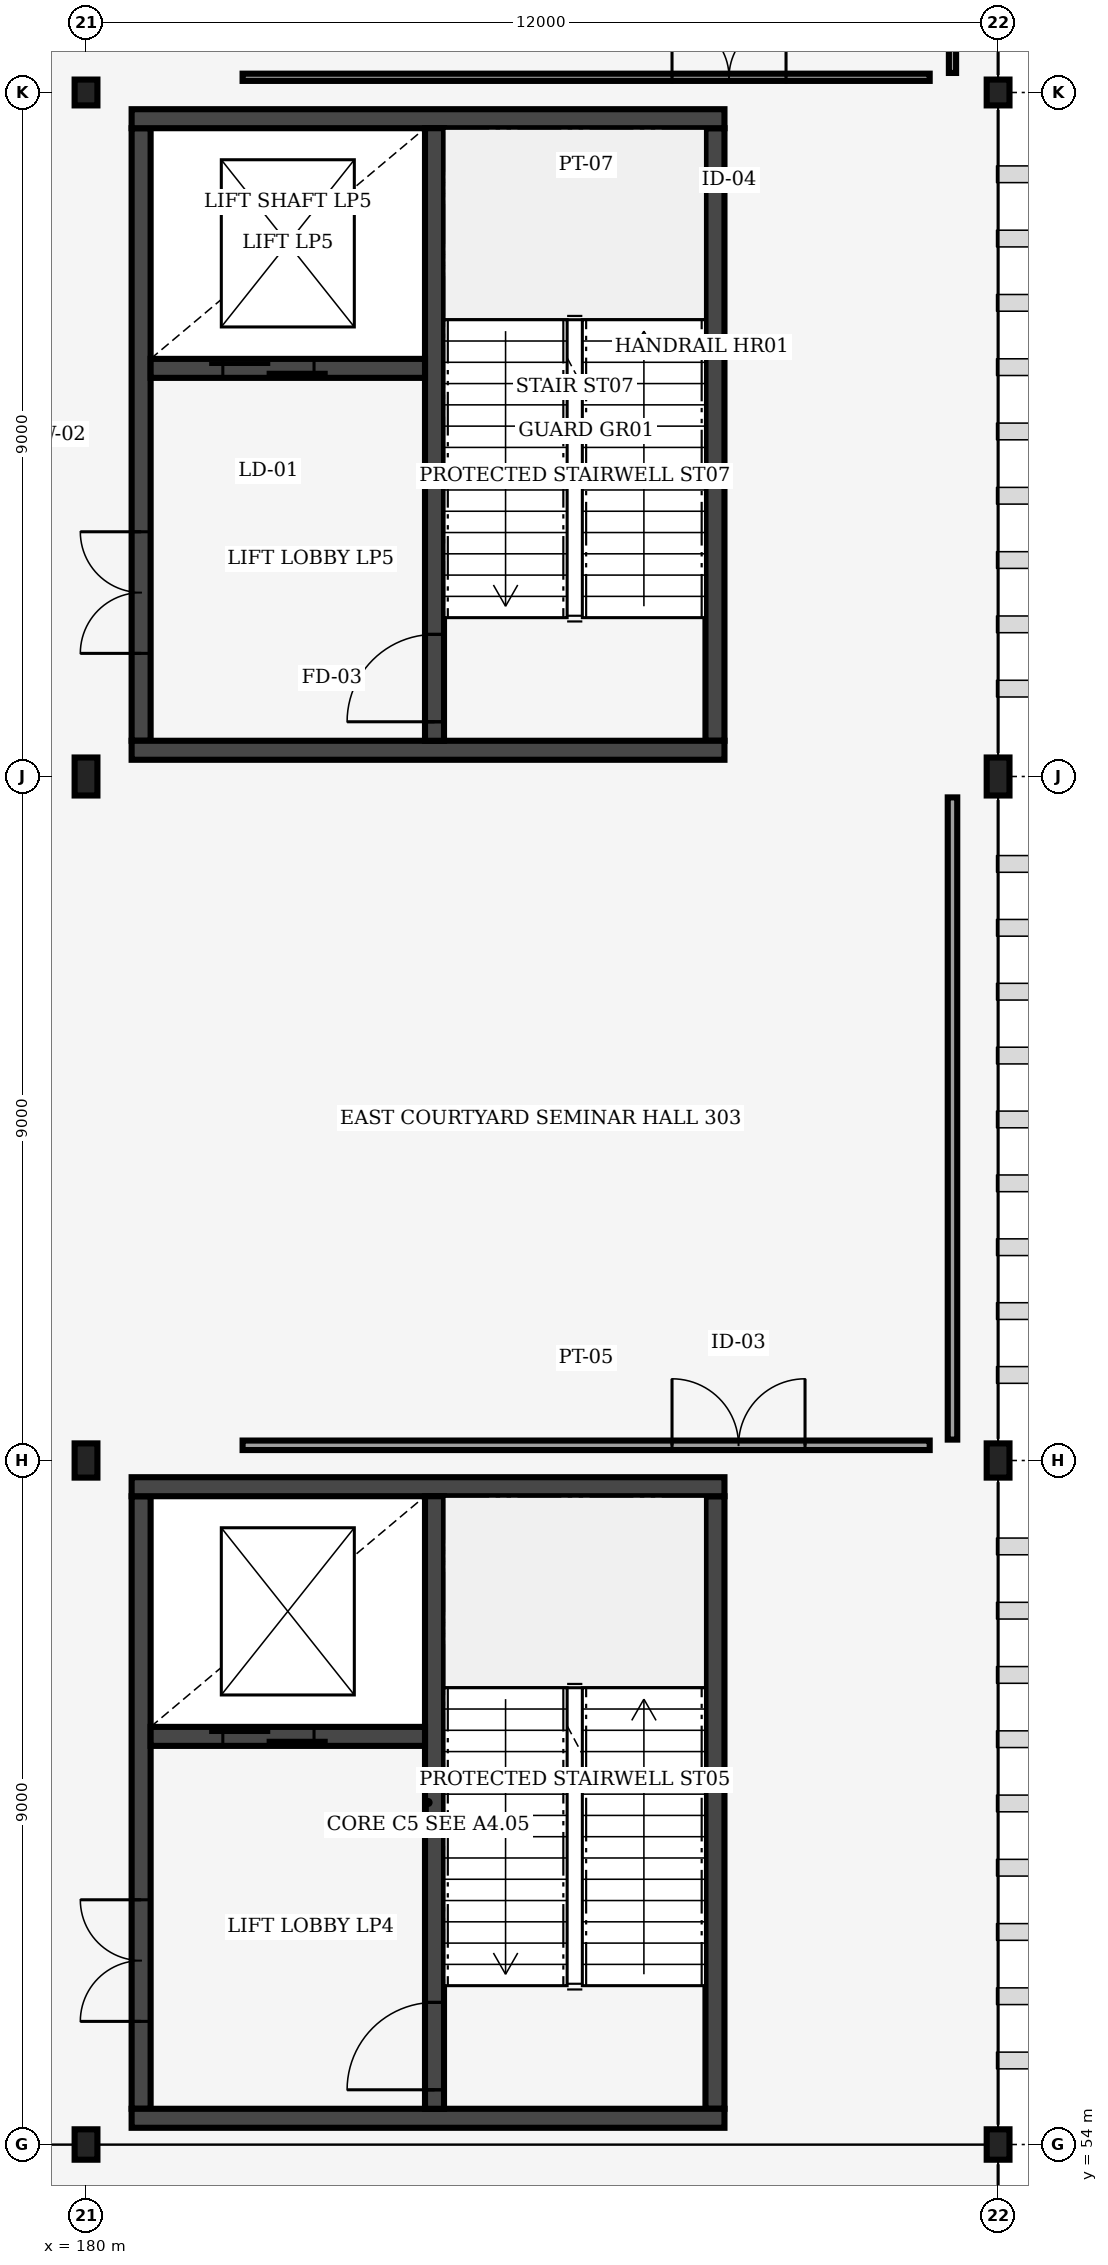
"""IFC4 building model, lengths in metres.
Left out: names, types, materials, properties, quantities, classifications, styles, units other than length and angle.
Written with IfcOpenShell. Run it as: python <this file> out.ifc"""

import sys

from ifc_helpers import new_model, si_unit, direction, frame, frame_2d, origin, origin_2d, place, context, subcontext, project, spatial, rectangle, i_section, extrude, element, fill, save


model = new_model("IFC4")
c1 = context("Model", 3, precision=1e-05, world=origin(), true_north=direction((0.0, 1.0)))
c2 = subcontext(c1, "Body", "Model", "MODEL_VIEW")
j1 = project(units=[si_unit("LENGTHUNIT", "METRE"), si_unit("PLANEANGLEUNIT", "RADIAN")], contexts=[c1])
p1 = place(None, origin())
s1 = spatial("IfcSite", under=j1, at=p1, CompositionType="ELEMENT")
p2 = place(p1, origin())
s2 = spatial("IfcBuilding", under=s1, at=p2, CompositionType="ELEMENT")
p3 = place(p2, frame((0.0, 0.0, 18.0)))
s3 = spatial("IfcBuildingStorey", under=s2, at=p3, CompositionType="ELEMENT", Elevation=18.0)
p4 = place(p3, frame((180.0, 54.0, 0.0), z_axis=(0.0, 0.0, 1.0), x_axis=(1.0, 0.0, 0.0)))
e1 = element("IfcColumn", 1, at=p4, inside=s3, PredefinedType="COLUMN", context=c2, shape_type="SweptSolid", body=[
    extrude(i_section(OverallWidth=0.3, OverallDepth=0.4, WebThickness=0.013, FlangeThickness=0.024, FilletRadius=0.027, at=origin_2d()), origin(), (0.0, 0.0, 1.0), 4.8),
])
p5 = place(p3, frame((180.0, 63.0, 0.0), z_axis=(0.0, 0.0, 1.0), x_axis=(1.0, 0.0, 0.0)))
e2 = element("IfcColumn", 2, at=p5, inside=s3, PredefinedType="COLUMN", context=c2, shape_type="SweptSolid", body=[
    extrude(i_section(OverallWidth=0.3, OverallDepth=0.45, WebThickness=0.014, FlangeThickness=0.026, FilletRadius=0.027, at=origin_2d()), origin(), (0.0, 0.0, 1.0), 4.8),
])
p6 = place(p3, frame((180.0, 72.0, 0.0), z_axis=(0.0, 0.0, 1.0), x_axis=(1.0, 0.0, 0.0)))
e3 = element("IfcColumn", 3, at=p6, inside=s3, PredefinedType="COLUMN", context=c2, shape_type="SweptSolid", body=[
    extrude(i_section(OverallWidth=0.3, OverallDepth=0.5, WebThickness=0.014, FlangeThickness=0.028, FilletRadius=0.027, at=origin_2d()), origin(), (0.0, 0.0, 1.0), 4.8),
])
p7 = place(p3, frame((180.0, 81.0, 0.0), z_axis=(0.0, 0.0, 1.0), x_axis=(1.0, 0.0, 0.0)))
e4 = element("IfcColumn", 4, at=p7, inside=s3, PredefinedType="COLUMN", context=c2, shape_type="SweptSolid", body=[
    extrude(i_section(OverallWidth=0.3, OverallDepth=0.34, WebThickness=0.012, FlangeThickness=0.021, FilletRadius=0.027, at=origin_2d()), origin(), (0.0, 0.0, 1.0), 4.8),
])
p8 = place(p3, frame((192.0, 54.0, 0.0), z_axis=(0.0, 0.0, 1.0), x_axis=(1.0, 0.0, 0.0)))
e5 = element("IfcColumn", 5, at=p8, inside=s3, PredefinedType="COLUMN", context=c2, shape_type="SweptSolid", body=[
    extrude(i_section(OverallWidth=0.3, OverallDepth=0.4, WebThickness=0.013, FlangeThickness=0.024, FilletRadius=0.027, at=origin_2d()), origin(), (0.0, 0.0, 1.0), 4.8),
])
p9 = place(p3, frame((192.0, 63.0, 0.0), z_axis=(0.0, 0.0, 1.0), x_axis=(1.0, 0.0, 0.0)))
e6 = element("IfcColumn", 6, at=p9, inside=s3, PredefinedType="COLUMN", context=c2, shape_type="SweptSolid", body=[
    extrude(i_section(OverallWidth=0.3, OverallDepth=0.45, WebThickness=0.014, FlangeThickness=0.026, FilletRadius=0.027, at=origin_2d()), origin(), (0.0, 0.0, 1.0), 4.8),
])
p10 = place(p3, frame((192.0, 72.0, 0.0), z_axis=(0.0, 0.0, 1.0), x_axis=(1.0, 0.0, 0.0)))
e7 = element("IfcColumn", 7, at=p10, inside=s3, PredefinedType="COLUMN", context=c2, shape_type="SweptSolid", body=[
    extrude(i_section(OverallWidth=0.3, OverallDepth=0.5, WebThickness=0.014, FlangeThickness=0.028, FilletRadius=0.027, at=origin_2d()), origin(), (0.0, 0.0, 1.0), 4.8),
])
p11 = place(p3, frame((192.0, 81.0, 0.0), z_axis=(0.0, 0.0, 1.0), x_axis=(1.0, 0.0, 0.0)))
e8 = element("IfcColumn", 8, at=p11, inside=s3, PredefinedType="COLUMN", context=c2, shape_type="SweptSolid", body=[
    extrude(i_section(OverallWidth=0.3, OverallDepth=0.34, WebThickness=0.012, FlangeThickness=0.021, FilletRadius=0.027, at=origin_2d()), origin(), (0.0, 0.0, 1.0), 4.8),
])
p12 = place(p3, frame((180.725, 54.47, 0.0), z_axis=(0.0, 0.0, 1.0), x_axis=(0.0, 1.0, 0.0)))
e9 = element("IfcWall", 9, at=p12, inside=s3, PredefinedType="SHEAR", context=c2, shape_type="SweptSolid", body=[
    extrude(rectangle(XDim=8.06, YDim=0.25, at=frame_2d((4.03, 0.0))), origin(), (0.0, 0.0, 1.0), 4.44),
])
p13 = place(p12, frame((1.15, 0.0, 0.0)))
e10 = element("IfcOpeningElement", 10, at=p13, cuts=e9, PredefinedType="OPENING", context=c2, shape_type="SweptSolid", body=[
    extrude(rectangle(XDim=1.6, YDim=2.2, at=frame_2d((0.8, 1.1))), frame((0.0, 0.135, 0.0), z_axis=(0.0, -1.0, 0.0), x_axis=(1.0, 0.0, 0.0)), (0.0, 0.0, 1.0), 0.27),
])
p14 = place(p3, frame((188.275, 54.47, 0.0), z_axis=(0.0, 0.0, 1.0), x_axis=(0.0, 1.0, 0.0)))
e11 = element("IfcWall", 11, at=p14, inside=s3, PredefinedType="SHEAR", context=c2, shape_type="SweptSolid", body=[
    extrude(rectangle(XDim=8.06, YDim=0.25, at=frame_2d((4.03, 0.0))), origin(), (0.0, 0.0, 1.0), 4.44),
])
for number, where, z_axis, x_axis in (
    (12, (180.6, 54.345, 0.0), (0.0, 0.0, 1.0), (1.0, 0.0, 0.0)),
    (13, (180.6, 62.655, 0.0), (0.0, 0.0, 1.0), (1.0, 0.0, 0.0)),
):
    element("IfcWall", number, at=place(p3, frame(where, z_axis=z_axis, x_axis=x_axis)), inside=s3, PredefinedType="SHEAR", context=c2, shape_type="SweptSolid", body=[
        extrude(rectangle(XDim=7.8, YDim=0.25, at=frame_2d((3.9, 0.0))), origin(), (0.0, 0.0, 1.0), 4.44),
    ])
p15 = place(p3, frame((184.585, 54.47, 0.0), z_axis=(0.0, 0.0, 1.0), x_axis=(0.0, 1.0, 0.0)))
e14 = element("IfcWall", 14, at=p15, inside=s3, PredefinedType="SHEAR", context=c2, shape_type="SweptSolid", body=[
    extrude(rectangle(XDim=8.06, YDim=0.25, at=frame_2d((4.03, 0.0))), origin(), (0.0, 0.0, 1.0), 4.44),
])
p16 = place(p15, frame((0.25, 0.0, 0.0)))
e15 = element("IfcOpeningElement", 15, at=p16, cuts=e14, PredefinedType="OPENING", context=c2, shape_type="SweptSolid", body=[
    extrude(rectangle(XDim=1.15, YDim=2.15, at=frame_2d((0.575, 1.075))), frame((0.0, 0.135, 0.0), z_axis=(0.0, -1.0, 0.0), x_axis=(1.0, 0.0, 0.0)), (0.0, 0.0, 1.0), 0.27),
])
p17 = place(p3, frame((180.85, 59.37, 0.0), z_axis=(0.0, 0.0, 1.0), x_axis=(1.0, 0.0, 0.0)))
e16 = element("IfcWall", 16, at=p17, inside=s3, PredefinedType="SHEAR", context=c2, shape_type="SweptSolid", body=[
    extrude(rectangle(XDim=3.61, YDim=0.25, at=frame_2d((1.805, 0.0))), origin(), (0.0, 0.0, 1.0), 4.44),
])
p18 = place(p17, frame((0.95, 0.0, 0.0)))
e17 = element("IfcOpeningElement", 17, at=p18, cuts=e16, PredefinedType="OPENING", context=c2, shape_type="SweptSolid", body=[
    extrude(rectangle(XDim=1.2, YDim=2.2, at=frame_2d((0.6, 1.1))), frame((0.0, 0.135, 0.0), z_axis=(0.0, -1.0, 0.0), x_axis=(1.0, 0.0, 0.0)), (0.0, 0.0, 1.0), 0.27),
])
p19 = place(p3, frame((180.725, 72.47, 0.0), z_axis=(0.0, 0.0, 1.0), x_axis=(0.0, 1.0, 0.0)))
e18 = element("IfcWall", 18, at=p19, inside=s3, PredefinedType="SHEAR", context=c2, shape_type="SweptSolid", body=[
    extrude(rectangle(XDim=8.06, YDim=0.25, at=frame_2d((4.03, 0.0))), origin(), (0.0, 0.0, 1.0), 4.44),
])
p20 = place(p19, frame((1.15, 0.0, 0.0)))
e19 = element("IfcOpeningElement", 19, at=p20, cuts=e18, PredefinedType="OPENING", context=c2, shape_type="SweptSolid", body=[
    extrude(rectangle(XDim=1.6, YDim=2.2, at=frame_2d((0.8, 1.1))), frame((0.0, 0.135, 0.0), z_axis=(0.0, -1.0, 0.0), x_axis=(1.0, 0.0, 0.0)), (0.0, 0.0, 1.0), 0.27),
])
p21 = place(p3, frame((188.275, 72.47, 0.0), z_axis=(0.0, 0.0, 1.0), x_axis=(0.0, 1.0, 0.0)))
e20 = element("IfcWall", 20, at=p21, inside=s3, PredefinedType="SHEAR", context=c2, shape_type="SweptSolid", body=[
    extrude(rectangle(XDim=8.06, YDim=0.25, at=frame_2d((4.03, 0.0))), origin(), (0.0, 0.0, 1.0), 4.44),
])
for number, where, z_axis, x_axis in (
    (21, (180.6, 72.345, 0.0), (0.0, 0.0, 1.0), (1.0, 0.0, 0.0)),
    (22, (180.6, 80.655, 0.0), (0.0, 0.0, 1.0), (1.0, 0.0, 0.0)),
):
    element("IfcWall", number, at=place(p3, frame(where, z_axis=z_axis, x_axis=x_axis)), inside=s3, PredefinedType="SHEAR", context=c2, shape_type="SweptSolid", body=[
        extrude(rectangle(XDim=7.8, YDim=0.25, at=frame_2d((3.9, 0.0))), origin(), (0.0, 0.0, 1.0), 4.44),
    ])
p22 = place(p3, frame((184.585, 72.47, 0.0), z_axis=(0.0, 0.0, 1.0), x_axis=(0.0, 1.0, 0.0)))
e23 = element("IfcWall", 23, at=p22, inside=s3, PredefinedType="SHEAR", context=c2, shape_type="SweptSolid", body=[
    extrude(rectangle(XDim=8.06, YDim=0.25, at=frame_2d((4.03, 0.0))), origin(), (0.0, 0.0, 1.0), 4.44),
])
p23 = place(p22, frame((0.25, 0.0, 0.0)))
e24 = element("IfcOpeningElement", 24, at=p23, cuts=e23, PredefinedType="OPENING", context=c2, shape_type="SweptSolid", body=[
    extrude(rectangle(XDim=1.15, YDim=2.15, at=frame_2d((0.575, 1.075))), frame((0.0, 0.135, 0.0), z_axis=(0.0, -1.0, 0.0), x_axis=(1.0, 0.0, 0.0)), (0.0, 0.0, 1.0), 0.27),
])
p24 = place(p3, frame((180.85, 77.37, 0.0), z_axis=(0.0, 0.0, 1.0), x_axis=(1.0, 0.0, 0.0)))
e25 = element("IfcWall", 25, at=p24, inside=s3, PredefinedType="SHEAR", context=c2, shape_type="SweptSolid", body=[
    extrude(rectangle(XDim=3.61, YDim=0.25, at=frame_2d((1.805, 0.0))), origin(), (0.0, 0.0, 1.0), 4.44),
])
p25 = place(p24, frame((0.95, 0.0, 0.0)))
e26 = element("IfcOpeningElement", 26, at=p25, cuts=e25, PredefinedType="OPENING", context=c2, shape_type="SweptSolid", body=[
    extrude(rectangle(XDim=1.2, YDim=2.2, at=frame_2d((0.6, 1.1))), frame((0.0, 0.135, 0.0), z_axis=(0.0, -1.0, 0.0), x_axis=(1.0, 0.0, 0.0)), (0.0, 0.0, 1.0), 0.27),
])
p26 = place(p3, frame((182.06, 63.2, 0.0), z_axis=(0.0, 0.0, 1.0), x_axis=(1.0, 0.0, 0.0)))
e27 = element("IfcWall", 27, at=p26, inside=s3, PredefinedType="PARTITIONING", context=c2, shape_type="SweptSolid", body=[
    extrude(rectangle(XDim=9.04, YDim=0.125, at=frame_2d((4.52, 0.0))), origin(), (0.0, 0.0, 1.0), 3.6),
])
p27 = place(p26, frame((5.65, 0.0, 0.0)))
e28 = element("IfcOpeningElement", 28, at=p27, cuts=e27, PredefinedType="OPENING", context=c2, shape_type="SweptSolid", body=[
    extrude(rectangle(XDim=1.75, YDim=2.3, at=frame_2d((0.875, 1.15))), frame((0.0, 0.073, 0.0), z_axis=(0.0, -1.0, 0.0), x_axis=(1.0, 0.0, 0.0)), (0.0, 0.0, 1.0), 0.145),
])
p28 = place(p3, frame((191.4, 63.275, 0.0), z_axis=(0.0, 0.0, 1.0), x_axis=(0.0, 1.0, 0.0)))
e29 = element("IfcWall", 29, at=p28, inside=s3, PredefinedType="PARTITIONING", context=c2, shape_type="SweptSolid", body=[
    extrude(rectangle(XDim=8.45, YDim=0.125, at=frame_2d((4.225, 0.0))), origin(), (0.0, 0.0, 1.0), 3.6),
])
p29 = place(p3, frame((182.06, 81.2, 0.0), z_axis=(0.0, 0.0, 1.0), x_axis=(1.0, 0.0, 0.0)))
e30 = element("IfcWall", 30, at=p29, inside=s3, PredefinedType="PARTITIONING", context=c2, shape_type="SweptSolid", body=[
    extrude(rectangle(XDim=9.04, YDim=0.095, at=frame_2d((4.52, 0.0))), origin(), (0.0, 0.0, 1.0), 3.6),
])
p30 = place(p29, frame((5.65, 0.0, 0.0)))
e31 = element("IfcOpeningElement", 31, at=p30, cuts=e30, PredefinedType="OPENING", context=c2, shape_type="SweptSolid", body=[
    extrude(rectangle(XDim=1.5, YDim=2.25, at=frame_2d((0.75, 1.125))), frame((0.0, 0.057, 0.0), z_axis=(0.0, -1.0, 0.0), x_axis=(1.0, 0.0, 0.0)), (0.0, 0.0, 1.0), 0.115),
])
p31 = place(p3, frame((191.4, 81.257, 0.0), z_axis=(0.0, 0.0, 1.0), x_axis=(0.0, 1.0, 0.0)))
e32 = element("IfcWall", 32, at=p31, inside=s3, PredefinedType="PARTITIONING", context=c2, shape_type="SweptSolid", body=[
    extrude(rectangle(XDim=8.486, YDim=0.095, at=frame_2d((4.243, 0.0))), origin(), (0.0, 0.0, 1.0), 3.6),
])
p32 = place(p16, origin())
e33 = element("IfcDoor", 33, at=p32, inside=s3, OperationType="SINGLE_SWING_LEFT", PredefinedType="DOOR", context=c2, shape_type="SweptSolid", body=[
    extrude(rectangle(XDim=1.15, YDim=2.15, at=frame_2d((0.575, 1.075))), frame((0.0, 0.025, 0.0), z_axis=(0.0, -1.0, 0.0), x_axis=(1.0, 0.0, 0.0)), (0.0, 0.0, 1.0), 0.05),
])
fill(e15, e33)
p33 = place(p18, origin())
e34 = element("IfcDoor", 34, at=p33, inside=s3, OperationType="DOUBLE_DOOR_SLIDING", PredefinedType="DOOR", context=c2, shape_type="SweptSolid", body=[
    extrude(rectangle(XDim=1.2, YDim=2.2, at=frame_2d((0.6, 1.1))), frame((0.0, 0.025, 0.0), z_axis=(0.0, -1.0, 0.0), x_axis=(1.0, 0.0, 0.0)), (0.0, 0.0, 1.0), 0.05),
])
fill(e17, e34)
p34 = place(p13, origin())
e35 = element("IfcDoor", 35, at=p34, inside=s3, OperationType="DOUBLE_DOOR_SINGLE_SWING", PredefinedType="DOOR", context=c2, shape_type="SweptSolid", body=[
    extrude(rectangle(XDim=1.6, YDim=2.2, at=frame_2d((0.8, 1.1))), frame((0.0, 0.025, 0.0), z_axis=(0.0, -1.0, 0.0), x_axis=(1.0, 0.0, 0.0)), (0.0, 0.0, 1.0), 0.05),
])
fill(e10, e35)
p35 = place(p23, origin())
e36 = element("IfcDoor", 36, at=p35, inside=s3, OperationType="SINGLE_SWING_LEFT", PredefinedType="DOOR", context=c2, shape_type="SweptSolid", body=[
    extrude(rectangle(XDim=1.15, YDim=2.15, at=frame_2d((0.575, 1.075))), frame((0.0, 0.025, 0.0), z_axis=(0.0, -1.0, 0.0), x_axis=(1.0, 0.0, 0.0)), (0.0, 0.0, 1.0), 0.05),
])
fill(e24, e36)
p36 = place(p25, origin())
e37 = element("IfcDoor", 37, at=p36, inside=s3, OperationType="DOUBLE_DOOR_SLIDING", PredefinedType="DOOR", context=c2, shape_type="SweptSolid", body=[
    extrude(rectangle(XDim=1.2, YDim=2.2, at=frame_2d((0.6, 1.1))), frame((0.0, 0.025, 0.0), z_axis=(0.0, -1.0, 0.0), x_axis=(1.0, 0.0, 0.0)), (0.0, 0.0, 1.0), 0.05),
])
fill(e26, e37)
p37 = place(p20, origin())
e38 = element("IfcDoor", 38, at=p37, inside=s3, OperationType="DOUBLE_DOOR_SINGLE_SWING", PredefinedType="DOOR", context=c2, shape_type="SweptSolid", body=[
    extrude(rectangle(XDim=1.6, YDim=2.2, at=frame_2d((0.8, 1.1))), frame((0.0, 0.025, 0.0), z_axis=(0.0, -1.0, 0.0), x_axis=(1.0, 0.0, 0.0)), (0.0, 0.0, 1.0), 0.05),
])
fill(e19, e38)
p38 = place(p27, origin())
e39 = element("IfcDoor", 39, at=p38, inside=s3, OperationType="DOUBLE_DOOR_SINGLE_SWING", PredefinedType="DOOR", context=c2, shape_type="SweptSolid", body=[
    extrude(rectangle(XDim=1.75, YDim=2.3, at=frame_2d((0.875, 1.15))), frame((0.0, 0.025, 0.0), z_axis=(0.0, -1.0, 0.0), x_axis=(1.0, 0.0, 0.0)), (0.0, 0.0, 1.0), 0.05),
])
fill(e28, e39)
p39 = place(p30, origin())
e40 = element("IfcDoor", 40, at=p39, inside=s3, OperationType="DOUBLE_DOOR_SINGLE_SWING", PredefinedType="DOOR", context=c2, shape_type="SweptSolid", body=[
    extrude(rectangle(XDim=1.5, YDim=2.25, at=frame_2d((0.75, 1.125))), frame((0.0, 0.025, 0.0), z_axis=(0.0, -1.0, 0.0), x_axis=(1.0, 0.0, 0.0)), (0.0, 0.0, 1.0), 0.05),
])
fill(e31, e40)
save(model, sys.argv[1])
